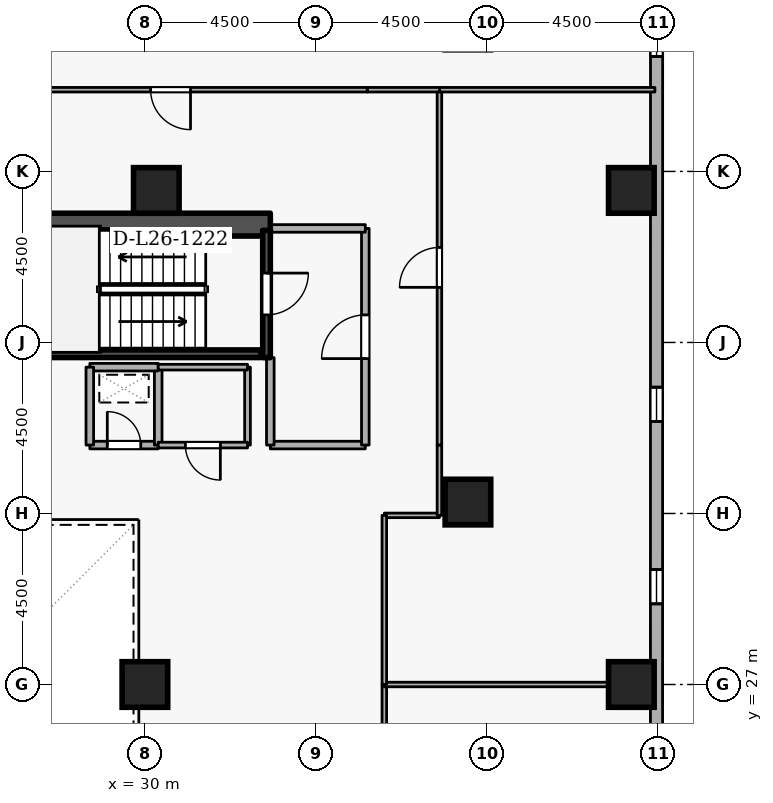
"""IFC4 building model, lengths in metres.
Left out: names, types, materials, properties, quantities, classifications, styles, units other than length and angle.
Written with IfcOpenShell. Run it as: python <this file> out.ifc"""

import sys

from ifc_helpers import new_model, si_unit, direction, frame, frame_2d, origin, origin_2d, place, context, subcontext, project, spatial, rectangle, extrude, element, fill, save


model = new_model("IFC4")
c1 = context("Model", 3, precision=1e-05, world=origin(), true_north=direction((0.0, 1.0)))
c2 = subcontext(c1, "Body", "Model", "MODEL_VIEW")
j1 = project(units=[si_unit("LENGTHUNIT", "METRE"), si_unit("PLANEANGLEUNIT", "RADIAN")], contexts=[c1])
p1 = place(None, origin())
s1 = spatial("IfcSite", under=j1, at=p1, CompositionType="ELEMENT")
p2 = place(p1, origin())
s2 = spatial("IfcBuilding", under=s1, at=p2, CompositionType="ELEMENT")
p3 = place(p2, frame((0.0, 0.0, 101.7)))
s3 = spatial("IfcBuildingStorey", under=s2, at=p3, CompositionType="ELEMENT", Elevation=101.7)
p4 = place(p3, frame((17.7, 39.1, 0.0), z_axis=(0.0, 0.0, 1.0), x_axis=(1.0, 0.0, 0.0)))
e1 = element("IfcWall", 1, at=p4, inside=s3, PredefinedType="SHEAR", context=c2, shape_type="SweptSolid", body=[
    extrude(rectangle(XDim=15.6, YDim=0.6, at=frame_2d((7.8, 0.0))), origin(), (0.0, 0.0, 1.0), 3.6),
])
for number, where, z_axis, x_axis in (
    (2, (42.8, 27.0, 0.0), (0.0, 0.0, 1.0), (1.0, 0.0, 0.0)),
    (3, (42.8, 40.0, 0.0), (0.0, 0.0, 1.0), (1.0, 0.0, 0.0)),
    (4, (38.5, 31.8, 0.0), (0.0, 0.0, 1.0), (1.0, 0.0, 0.0)),
    (5, (30.3, 40.0, 0.0), (0.0, 0.0, 1.0), (1.0, 0.0, 0.0)),
    (6, (30.0, 27.0, 0.0), (0.0, 0.0, 1.0), (1.0, 0.0, 0.0)),
):
    element("IfcColumn", number, at=place(p3, frame(where, z_axis=z_axis, x_axis=x_axis)), inside=s3, PredefinedType="COLUMN", context=c2, shape_type="SweptSolid", body=[
        extrude(rectangle(XDim=1.2, YDim=1.2, at=origin_2d()), origin(), (0.0, 0.0, 1.0), 3.6),
    ])
p5 = place(p3, frame((43.46, 12.923, 0.0), z_axis=(0.0, 0.0, 1.0), x_axis=(0.00011704845, 0.99999999315, 0.0)))
e7 = element("IfcWall", 7, at=p5, inside=s3, PredefinedType="STANDARD", context=c2, shape_type="SweptSolid", body=[
    extrude(rectangle(XDim=35.459, YDim=0.32, at=frame_2d((17.729, 0.0))), origin(), (0.0, 0.0, 1.0), 2.7),
])
p6 = place(p5, frame((6.6, 0.0, 0.72)))
e8 = element("IfcOpeningElement", 8, at=p6, cuts=e7, PredefinedType="OPENING", context=c2, shape_type="SweptSolid", body=[
    extrude(rectangle(XDim=0.9, YDim=1.75, at=frame_2d((0.45, 0.875))), frame((0.0, 0.17, 0.0), z_axis=(0.0, -1.0, 0.0), x_axis=(1.0, 0.0, 0.0)), (0.0, 0.0, 1.0), 0.34),
])
p7 = place(p5, frame((11.4, 0.0, 0.72)))
e9 = element("IfcOpeningElement", 9, at=p7, cuts=e7, PredefinedType="OPENING", context=c2, shape_type="SweptSolid", body=[
    extrude(rectangle(XDim=0.9, YDim=1.75, at=frame_2d((0.45, 0.875))), frame((0.0, 0.17, 0.0), z_axis=(0.0, -1.0, 0.0), x_axis=(1.0, 0.0, 0.0)), (0.0, 0.0, 1.0), 0.34),
])
p8 = place(p5, frame((16.2, 0.0, 0.72)))
e10 = element("IfcOpeningElement", 10, at=p8, cuts=e7, PredefinedType="OPENING", context=c2, shape_type="SweptSolid", body=[
    extrude(rectangle(XDim=0.9, YDim=1.75, at=frame_2d((0.45, 0.875))), frame((0.0, 0.17, 0.0), z_axis=(0.0, -1.0, 0.0), x_axis=(1.0, 0.0, 0.0)), (0.0, 0.0, 1.0), 0.34),
])
p9 = place(p5, frame((21.0, 0.0, 0.72)))
e11 = element("IfcOpeningElement", 11, at=p9, cuts=e7, PredefinedType="OPENING", context=c2, shape_type="SweptSolid", body=[
    extrude(rectangle(XDim=0.9, YDim=1.75, at=frame_2d((0.45, 0.875))), frame((0.0, 0.17, 0.0), z_axis=(0.0, -1.0, 0.0), x_axis=(1.0, 0.0, 0.0)), (0.0, 0.0, 1.0), 0.34),
])
p10 = place(p5, frame((30.6, 0.0, 0.72)))
e12 = element("IfcOpeningElement", 12, at=p10, cuts=e7, PredefinedType="OPENING", context=c2, shape_type="SweptSolid", body=[
    extrude(rectangle(XDim=0.9, YDim=1.75, at=frame_2d((0.45, 0.875))), frame((0.0, 0.17, 0.0), z_axis=(0.0, -1.0, 0.0), x_axis=(1.0, 0.0, 0.0)), (0.0, 0.0, 1.0), 0.34),
])
p11 = place(p3, frame((33.2, 38.95, 0.0), z_axis=(0.0, 0.0, 1.0), x_axis=(0.0, -1.0, 0.0)))
e13 = element("IfcWall", 13, at=p11, inside=s3, PredefinedType="SHEAR", context=c2, shape_type="SweptSolid", body=[
    extrude(rectangle(XDim=3.35, YDim=0.2, at=frame_2d((1.675, 0.0))), origin(), (0.0, 0.0, 1.0), 3.6),
])
p12 = place(p11, frame((1.125, 0.0, 0.0)))
e14 = element("IfcOpeningElement", 14, at=p12, cuts=e13, PredefinedType="OPENING", context=c2, shape_type="SweptSolid", body=[
    extrude(rectangle(XDim=1.1, YDim=2.1, at=frame_2d((0.55, 1.05))), frame((0.0, 0.11, 0.0), z_axis=(0.0, -1.0, 0.0), x_axis=(1.0, 0.0, 0.0)), (0.0, 0.0, 1.0), 0.22),
])
p13 = place(p3, frame((25.95, 35.703, 0.0), z_axis=(0.0, 0.0, 1.0), x_axis=(1.0, 0.0, 0.0)))
e15 = element("IfcWall", 15, at=p13, inside=s3, PredefinedType="SHEAR", context=c2, shape_type="SweptSolid", body=[
    extrude(rectangle(XDim=7.1, YDim=0.2, at=frame_2d((3.55, 0.0))), origin(), (0.0, 0.0, 1.0), 3.6),
])
p14 = place(p3, frame((33.3, 33.3, 0.0), z_axis=(0.0, 0.0, 1.0), x_axis=(1.0, 0.0, 0.0)))
e16 = element("IfcWall", 16, at=p14, inside=s3, PredefinedType="STANDARD", context=c2, shape_type="SweptSolid", body=[
    extrude(rectangle(XDim=2.5, YDim=0.2, at=frame_2d((1.25, 0.0))), origin(), (0.0, 0.0, 1.0), 3.34),
])
p15 = place(p3, frame((35.8, 33.3, 0.0), z_axis=(0.0, 0.0, 1.0), x_axis=(0.0, 1.0, 0.0)))
e17 = element("IfcWall", 17, at=p15, inside=s3, PredefinedType="STANDARD", context=c2, shape_type="SweptSolid", body=[
    extrude(rectangle(XDim=5.7, YDim=0.2, at=frame_2d((2.85, 0.0))), origin(), (0.0, 0.0, 1.0), 3.34),
])
p16 = place(p15, frame((2.275, 0.0, 0.0)))
e18 = element("IfcOpeningElement", 18, at=p16, cuts=e17, PredefinedType="OPENING", context=c2, shape_type="SweptSolid", body=[
    extrude(rectangle(XDim=1.15, YDim=2.1, at=frame_2d((0.575, 1.05))), frame((0.0, 0.11, 0.0), z_axis=(0.0, -1.0, 0.0), x_axis=(1.0, 0.0, 0.0)), (0.0, 0.0, 1.0), 0.22),
])
p17 = place(p3, frame((35.8, 39.0, 0.0), z_axis=(0.0, 0.0, 1.0), x_axis=(-1.0, 0.0, 0.0)))
e19 = element("IfcWall", 19, at=p17, inside=s3, PredefinedType="STANDARD", context=c2, shape_type="SweptSolid", body=[
    extrude(rectangle(XDim=2.5, YDim=0.2, at=frame_2d((1.25, 0.0))), origin(), (0.0, 0.0, 1.0), 3.34),
])
p18 = place(p3, frame((33.3, 35.6, 0.0), z_axis=(0.0, 0.0, 1.0), x_axis=(0.0, -1.0, 0.0)))
e20 = element("IfcWall", 20, at=p18, inside=s3, PredefinedType="STANDARD", context=c2, shape_type="SweptSolid", body=[
    extrude(rectangle(XDim=2.3, YDim=0.2, at=frame_2d((1.15, 0.0))), origin(), (0.0, 0.0, 1.0), 2.545),
])
p19 = place(p3, frame((28.55, 33.3, 0.0), z_axis=(0.0, 0.0, 1.0), x_axis=(1.0, 0.0, 0.0)))
e21 = element("IfcWall", 21, at=p19, inside=s3, PredefinedType="STANDARD", context=c2, shape_type="SweptSolid", body=[
    extrude(rectangle(XDim=1.8, YDim=0.2, at=frame_2d((0.9, 0.0))), origin(), (0.0, 0.0, 1.0), 3.34),
])
p20 = place(p19, frame((0.46, 0.0, 0.0)))
e22 = element("IfcOpeningElement", 22, at=p20, cuts=e21, PredefinedType="OPENING", context=c2, shape_type="SweptSolid", body=[
    extrude(rectangle(XDim=0.88, YDim=2.04, at=frame_2d((0.44, 1.02))), frame((0.0, 0.11, 0.0), z_axis=(0.0, -1.0, 0.0), x_axis=(1.0, 0.0, 0.0)), (0.0, 0.0, 1.0), 0.22),
])
p21 = place(p3, frame((30.35, 33.3, 0.0), z_axis=(0.0, 0.0, 1.0), x_axis=(0.0, 1.0, 0.0)))
e23 = element("IfcWall", 23, at=p21, inside=s3, PredefinedType="STANDARD", context=c2, shape_type="SweptSolid", body=[
    extrude(rectangle(XDim=2.05, YDim=0.2, at=frame_2d((1.025, 0.0))), origin(), (0.0, 0.0, 1.0), 3.34),
])
p22 = place(p3, frame((30.35, 35.35, 0.0), z_axis=(0.0, 0.0, 1.0), x_axis=(-1.0, 0.0, 0.0)))
e24 = element("IfcWall", 24, at=p22, inside=s3, PredefinedType="STANDARD", context=c2, shape_type="SweptSolid", body=[
    extrude(rectangle(XDim=1.8, YDim=0.2, at=frame_2d((0.9, 0.0))), origin(), (0.0, 0.0, 1.0), 3.34),
])
p23 = place(p3, frame((28.55, 35.35, 0.0), z_axis=(0.0, 0.0, 1.0), x_axis=(0.0, -1.0, 0.0)))
e25 = element("IfcWall", 25, at=p23, inside=s3, PredefinedType="STANDARD", context=c2, shape_type="SweptSolid", body=[
    extrude(rectangle(XDim=2.05, YDim=0.2, at=frame_2d((1.025, 0.0))), origin(), (0.0, 0.0, 1.0), 3.34),
])
p24 = place(p3, frame((32.7, 35.35, 0.0), z_axis=(0.0, 0.0, 1.0), x_axis=(0.0, -1.0, 0.0)))
e26 = element("IfcWall", 26, at=p24, inside=s3, PredefinedType="PARTITIONING", context=c2, shape_type="SweptSolid", body=[
    extrude(rectangle(XDim=2.05, YDim=0.15, at=frame_2d((1.025, 0.0))), origin(), (0.0, 0.0, 1.0), 2.545),
])
p25 = place(p3, frame((32.7, 33.3, 0.0), z_axis=(0.0, 0.0, 1.0), x_axis=(-1.0, 0.0, 0.0)))
e27 = element("IfcWall", 27, at=p25, inside=s3, PredefinedType="PARTITIONING", context=c2, shape_type="SweptSolid", body=[
    extrude(rectangle(XDim=2.35, YDim=0.15, at=frame_2d((1.175, 0.0))), origin(), (0.0, 0.0, 1.0), 3.34),
])
p26 = place(p25, frame((0.715, 0.0, 0.0)))
e28 = element("IfcOpeningElement", 28, at=p26, cuts=e27, PredefinedType="OPENING", context=c2, shape_type="SweptSolid", body=[
    extrude(rectangle(XDim=0.92, YDim=2.08, at=frame_2d((0.46, 1.04))), frame((0.0, 0.085, 0.0), z_axis=(0.0, -1.0, 0.0), x_axis=(1.0, 0.0, 0.0)), (0.0, 0.0, 1.0), 0.17),
])
p27 = place(p3, frame((30.35, 35.35, 0.0), z_axis=(0.0, 0.0, 1.0), x_axis=(1.0, 0.0, 0.0)))
e29 = element("IfcWall", 29, at=p27, inside=s3, PredefinedType="PARTITIONING", context=c2, shape_type="SweptSolid", body=[
    extrude(rectangle(XDim=2.35, YDim=0.15, at=frame_2d((1.175, 0.0))), origin(), (0.0, 0.0, 1.0), 3.34),
])
p28 = place(p3, frame((36.3, 22.55, 0.0), z_axis=(0.0, 0.0, 1.0), x_axis=(0.0, 1.0, 0.0)))
e30 = element("IfcWall", 30, at=p28, inside=s3, PredefinedType="PARTITIONING", context=c2, shape_type="SweptSolid", body=[
    extrude(rectangle(XDim=4.45, YDim=0.12, at=frame_2d((2.225, 0.0))), origin(), (0.0, 0.0, 1.0), 3.34),
])
p29 = place(p28, frame((1.7, 0.0, 0.0)))
e31 = element("IfcOpeningElement", 31, at=p29, cuts=e30, PredefinedType="OPENING", context=c2, shape_type="SweptSolid", body=[
    extrude(rectangle(XDim=1.05, YDim=2.1, at=frame_2d((0.525, 1.05))), frame((0.0, 0.07, 0.0), z_axis=(0.0, -1.0, 0.0), x_axis=(1.0, 0.0, 0.0)), (0.0, 0.0, 1.0), 0.14),
])
p30 = place(p3, frame((36.3, 27.0, 0.0), z_axis=(0.0, 0.0, 1.0), x_axis=(1.0, 0.0, 0.0)))
e32 = element("IfcWall", 32, at=p30, inside=s3, PredefinedType="PARTITIONING", context=c2, shape_type="SweptSolid", body=[
    extrude(rectangle(XDim=7.12, YDim=0.12, at=frame_2d((3.56, 0.0))), origin(), (0.0, 0.0, 1.0), 2.878),
])
p31 = place(p3, frame((36.3, 31.45, 0.0), z_axis=(0.0, 0.0, 1.0), x_axis=(1.0, 0.0, 0.0)))
e33 = element("IfcWall", 33, at=p31, inside=s3, PredefinedType="PARTITIONING", context=c2, shape_type="SweptSolid", body=[
    extrude(rectangle(XDim=1.45, YDim=0.12, at=frame_2d((0.725, 0.0))), origin(), (0.0, 0.0, 1.0), 3.34),
])
p32 = place(p3, frame((37.75, 31.45, 0.0), z_axis=(0.0, 0.0, 1.0), x_axis=(0.0, 1.0, 0.0)))
e34 = element("IfcWall", 34, at=p32, inside=s3, PredefinedType="PARTITIONING", context=c2, shape_type="SweptSolid", body=[
    extrude(rectangle(XDim=1.85, YDim=0.12, at=frame_2d((0.925, 0.0))), origin(), (0.0, 0.0, 1.0), 3.34),
])
p33 = place(p3, frame((37.75, 33.3, 0.0), z_axis=(0.0, 0.0, 1.0), x_axis=(0.0, 1.0, 0.0)))
e35 = element("IfcWall", 35, at=p33, inside=s3, PredefinedType="PARTITIONING", context=c2, shape_type="SweptSolid", body=[
    extrude(rectangle(XDim=9.35, YDim=0.12, at=frame_2d((4.675, 0.0))), origin(), (0.0, 0.0, 1.0), 3.34),
])
p34 = place(p33, frame((4.15, 0.0, 0.0)))
e36 = element("IfcOpeningElement", 36, at=p34, cuts=e35, PredefinedType="OPENING", context=c2, shape_type="SweptSolid", body=[
    extrude(rectangle(XDim=1.05, YDim=2.1, at=frame_2d((0.525, 1.05))), frame((0.0, 0.07, 0.0), z_axis=(0.0, -1.0, 0.0), x_axis=(1.0, 0.0, 0.0)), (0.0, 0.0, 1.0), 0.14),
])
p35 = place(p3, frame((37.75, 42.65, 0.0), z_axis=(0.0, 0.0, 1.0), x_axis=(1.0, 0.0, 0.0)))
e37 = element("IfcWall", 37, at=p35, inside=s3, PredefinedType="PARTITIONING", context=c2, shape_type="SweptSolid", body=[
    extrude(rectangle(XDim=5.67, YDim=0.12, at=frame_2d((2.835, 0.0))), origin(), (0.0, 0.0, 1.0), 3.34),
])
p36 = place(p3, frame((36.3, 27.0, 0.0), z_axis=(0.0, 0.0, 1.0), x_axis=(0.0, 1.0, 0.0)))
e38 = element("IfcWall", 38, at=p36, inside=s3, PredefinedType="PARTITIONING", context=c2, shape_type="SweptSolid", body=[
    extrude(rectangle(XDim=4.45, YDim=0.12, at=frame_2d((2.225, 0.0))), origin(), (0.0, 0.0, 1.0), 3.34),
])
p37 = place(p3, frame((37.75, 42.65, 0.0), z_axis=(0.0, 0.0, 1.0), x_axis=(-1.0, 0.0, 0.0)))
e39 = element("IfcWall", 39, at=p37, inside=s3, PredefinedType="PARTITIONING", context=c2, shape_type="SweptSolid", body=[
    extrude(rectangle(XDim=1.9, YDim=0.12, at=frame_2d((0.95, 0.0))), origin(), (0.0, 0.0, 1.0), 3.34),
])
p38 = place(p3, frame((35.85, 42.65, 0.0), z_axis=(0.0, 0.0, 1.0), x_axis=(-1.0, 0.0, 0.0)))
e40 = element("IfcWall", 40, at=p38, inside=s3, PredefinedType="PARTITIONING", context=c2, shape_type="SweptSolid", body=[
    extrude(rectangle(XDim=10.35, YDim=0.12, at=frame_2d((5.175, 0.0))), origin(), (0.0, 0.0, 1.0), 2.895),
])
p39 = place(p38, frame((4.65, 0.0, 0.0)))
e41 = element("IfcOpeningElement", 41, at=p39, cuts=e40, PredefinedType="OPENING", context=c2, shape_type="SweptSolid", body=[
    extrude(rectangle(XDim=1.05, YDim=2.1, at=frame_2d((0.525, 1.05))), frame((0.0, 0.07, 0.0), z_axis=(0.0, -1.0, 0.0), x_axis=(1.0, 0.0, 0.0)), (0.0, 0.0, 1.0), 0.14),
])
p40 = place(p8, origin())
e42 = element("IfcWindow", 42, at=p40, inside=s3, PartitioningType="SINGLE_PANEL", PredefinedType="WINDOW", context=c2, shape_type="SweptSolid", body=[
    extrude(rectangle(XDim=0.9, YDim=1.75, at=frame_2d((0.45, 0.875))), frame((0.0, 0.03, 0.0), z_axis=(0.0, -1.0, 0.0), x_axis=(1.0, 0.0, 0.0)), (0.0, 0.0, 1.0), 0.06),
])
fill(e10, e42)
p41 = place(p9, origin())
e43 = element("IfcWindow", 43, at=p41, inside=s3, PartitioningType="SINGLE_PANEL", PredefinedType="WINDOW", context=c2, shape_type="SweptSolid", body=[
    extrude(rectangle(XDim=0.9, YDim=1.75, at=frame_2d((0.45, 0.875))), frame((0.0, 0.03, 0.0), z_axis=(0.0, -1.0, 0.0), x_axis=(1.0, 0.0, 0.0)), (0.0, 0.0, 1.0), 0.06),
])
fill(e11, e43)
p42 = place(p10, origin())
e44 = element("IfcWindow", 44, at=p42, inside=s3, PartitioningType="SINGLE_PANEL", PredefinedType="WINDOW", context=c2, shape_type="SweptSolid", body=[
    extrude(rectangle(XDim=0.9, YDim=1.75, at=frame_2d((0.45, 0.875))), frame((0.0, 0.03, 0.0), z_axis=(0.0, -1.0, 0.0), x_axis=(1.0, 0.0, 0.0)), (0.0, 0.0, 1.0), 0.06),
])
fill(e12, e44)
p43 = place(p12, origin())
e45 = element("IfcDoor", 45, at=p43, inside=s3, OperationType="SINGLE_SWING_LEFT", PredefinedType="DOOR", context=c2, shape_type="SweptSolid", body=[
    extrude(rectangle(XDim=1.1, YDim=2.1, at=frame_2d((0.55, 1.05))), frame((0.0, 0.025, 0.0), z_axis=(0.0, -1.0, 0.0), x_axis=(1.0, 0.0, 0.0)), (0.0, 0.0, 1.0), 0.05),
])
fill(e14, e45)
p44 = place(p16, origin())
e46 = element("IfcDoor", 46, at=p44, inside=s3, OperationType="SINGLE_SWING_LEFT", PredefinedType="DOOR", context=c2, shape_type="SweptSolid", body=[
    extrude(rectangle(XDim=1.15, YDim=2.1, at=frame_2d((0.575, 1.05))), frame((0.0, 0.025, 0.0), z_axis=(0.0, -1.0, 0.0), x_axis=(1.0, 0.0, 0.0)), (0.0, 0.0, 1.0), 0.05),
])
fill(e18, e46)
p45 = place(p20, origin())
e47 = element("IfcDoor", 47, at=p45, inside=s3, OperationType="SINGLE_SWING_LEFT", PredefinedType="DOOR", context=c2, shape_type="SweptSolid", body=[
    extrude(rectangle(XDim=0.88, YDim=2.04, at=frame_2d((0.44, 1.02))), frame((0.0, 0.025, 0.0), z_axis=(0.0, -1.0, 0.0), x_axis=(1.0, 0.0, 0.0)), (0.0, 0.0, 1.0), 0.05),
])
fill(e22, e47)
p46 = place(p26, origin())
e48 = element("IfcDoor", 48, at=p46, inside=s3, OperationType="SINGLE_SWING_LEFT", PredefinedType="DOOR", context=c2, shape_type="SweptSolid", body=[
    extrude(rectangle(XDim=0.92, YDim=2.08, at=frame_2d((0.46, 1.04))), frame((0.0, 0.025, 0.0), z_axis=(0.0, -1.0, 0.0), x_axis=(1.0, 0.0, 0.0)), (0.0, 0.0, 1.0), 0.05),
])
fill(e28, e48)
p47 = place(p34, origin())
e49 = element("IfcDoor", 49, at=p47, inside=s3, OperationType="SINGLE_SWING_LEFT", PredefinedType="DOOR", context=c2, shape_type="SweptSolid", body=[
    extrude(rectangle(XDim=1.05, YDim=2.1, at=frame_2d((0.525, 1.05))), frame((0.0, 0.025, 0.0), z_axis=(0.0, -1.0, 0.0), x_axis=(1.0, 0.0, 0.0)), (0.0, 0.0, 1.0), 0.05),
])
fill(e36, e49)
p48 = place(p39, origin())
e50 = element("IfcDoor", 50, at=p48, inside=s3, OperationType="SINGLE_SWING_LEFT", PredefinedType="DOOR", context=c2, shape_type="SweptSolid", body=[
    extrude(rectangle(XDim=1.05, YDim=2.1, at=frame_2d((0.525, 1.05))), frame((0.0, 0.025, 0.0), z_axis=(0.0, -1.0, 0.0), x_axis=(1.0, 0.0, 0.0)), (0.0, 0.0, 1.0), 0.05),
])
fill(e41, e50)
save(model, sys.argv[1])
